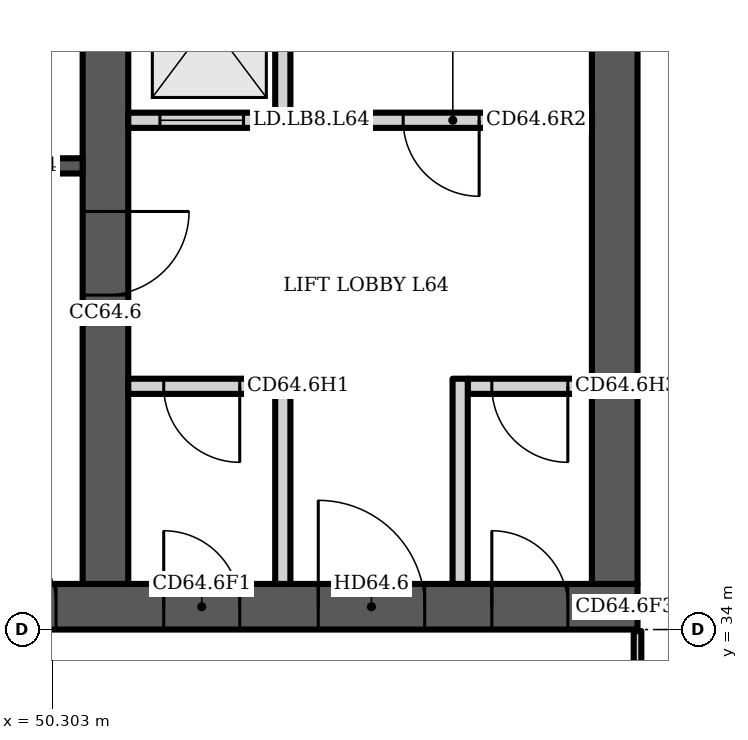
"""IFC4 building model, lengths in metres.
Left out: names, types, materials, properties, quantities, classifications, styles, units other than length and angle.
Written with IfcOpenShell. Run it as: python <this file> out.ifc"""

import sys

from ifc_helpers import new_model, si_unit, direction, frame, frame_2d, origin, place, context, subcontext, project, spatial, polyline, rectangle, outline, extrude, element, fill, save


model = new_model("IFC4")
c1 = context("Model", 3, precision=1e-05, world=origin(), true_north=direction((0.0, 1.0)))
c2 = subcontext(c1, "Body", "Model", "MODEL_VIEW")
j1 = project(units=[si_unit("LENGTHUNIT", "METRE"), si_unit("PLANEANGLEUNIT", "RADIAN")], contexts=[c1])
p1 = place(None, origin())
s1 = spatial("IfcSite", under=j1, at=p1, CompositionType="ELEMENT")
p2 = place(p1, origin())
s2 = spatial("IfcBuilding", under=s1, at=p2, CompositionType="ELEMENT")
p3 = place(p2, frame((0.0, 0.0, 253.9)))
s3 = spatial("IfcBuildingStorey", under=s2, at=p3, CompositionType="ELEMENT", Elevation=253.9)
p4 = place(p3, frame((23.0, 34.3, 0.0), z_axis=(0.0, 0.0, 1.0), x_axis=(1.0, 0.0, 0.0)))
e1 = element("IfcWall", 1, at=p4, inside=s3, PredefinedType="SHEAR", context=c2, shape_type="SweptSolid", body=[
    extrude(rectangle(XDim=35.0, YDim=0.6, at=frame_2d((17.5, 0.0))), origin(), (0.0, 0.0, 1.0), 3.6),
])
p5 = place(p4, frame((0.65, 0.0, 0.0)))
e2 = element("IfcOpeningElement", 2, at=p5, cuts=e1, PredefinedType="OPENING", context=c2, shape_type="SweptSolid", body=[
    extrude(rectangle(XDim=1.2, YDim=2.1, at=frame_2d((0.6, 1.05))), frame((0.0, 0.31, 0.0), z_axis=(0.0, -1.0, 0.0), x_axis=(1.0, 0.0, 0.0)), (0.0, 0.0, 1.0), 0.62),
])
p6 = place(p4, frame((7.717, 0.0, 0.0)))
e3 = element("IfcOpeningElement", 3, at=p6, cuts=e1, PredefinedType="OPENING", context=c2, shape_type="SweptSolid", body=[
    extrude(rectangle(XDim=1.1, YDim=2.1, at=frame_2d((0.55, 1.05))), frame((0.0, 0.31, 0.0), z_axis=(0.0, -1.0, 0.0), x_axis=(1.0, 0.0, 0.0)), (0.0, 0.0, 1.0), 0.62),
])
p7 = place(p4, frame((12.183, 0.0, 0.0)))
e4 = element("IfcOpeningElement", 4, at=p7, cuts=e1, PredefinedType="OPENING", context=c2, shape_type="SweptSolid", body=[
    extrude(rectangle(XDim=1.1, YDim=2.1, at=frame_2d((0.55, 1.05))), frame((0.0, 0.31, 0.0), z_axis=(0.0, -1.0, 0.0), x_axis=(1.0, 0.0, 0.0)), (0.0, 0.0, 1.0), 0.62),
])
p8 = place(p4, frame((9.8, 0.0, 0.0)))
e5 = element("IfcOpeningElement", 5, at=p8, cuts=e1, PredefinedType="OPENING", context=c2, shape_type="SweptSolid", body=[
    extrude(rectangle(XDim=1.4, YDim=2.1, at=frame_2d((0.7, 1.05))), frame((0.0, 0.31, 0.0), z_axis=(0.0, -1.0, 0.0), x_axis=(1.0, 0.0, 0.0)), (0.0, 0.0, 1.0), 0.62),
])
p9 = place(p4, frame((14.717, 0.0, 0.0)))
e6 = element("IfcOpeningElement", 6, at=p9, cuts=e1, PredefinedType="OPENING", context=c2, shape_type="SweptSolid", body=[
    extrude(rectangle(XDim=1.1, YDim=2.1, at=frame_2d((0.55, 1.05))), frame((0.0, 0.31, 0.0), z_axis=(0.0, -1.0, 0.0), x_axis=(1.0, 0.0, 0.0)), (0.0, 0.0, 1.0), 0.62),
])
p10 = place(p4, frame((16.95, 0.0, 0.0)))
e7 = element("IfcOpeningElement", 7, at=p10, cuts=e1, PredefinedType="OPENING", context=c2, shape_type="SweptSolid", body=[
    extrude(rectangle(XDim=1.1, YDim=2.1, at=frame_2d((0.55, 1.05))), frame((0.0, 0.31, 0.0), z_axis=(0.0, -1.0, 0.0), x_axis=(1.0, 0.0, 0.0)), (0.0, 0.0, 1.0), 0.62),
])
p11 = place(p4, frame((19.183, 0.0, 0.0)))
e8 = element("IfcOpeningElement", 8, at=p11, cuts=e1, PredefinedType="OPENING", context=c2, shape_type="SweptSolid", body=[
    extrude(rectangle(XDim=1.1, YDim=2.1, at=frame_2d((0.55, 1.05))), frame((0.0, 0.31, 0.0), z_axis=(0.0, -1.0, 0.0), x_axis=(1.0, 0.0, 0.0)), (0.0, 0.0, 1.0), 0.62),
])
p12 = place(p4, frame((26.15, 0.0, 0.0)))
e9 = element("IfcOpeningElement", 9, at=p12, cuts=e1, PredefinedType="OPENING", context=c2, shape_type="SweptSolid", body=[
    extrude(rectangle(XDim=1.2, YDim=2.1, at=frame_2d((0.6, 1.05))), frame((0.0, 0.31, 0.0), z_axis=(0.0, -1.0, 0.0), x_axis=(1.0, 0.0, 0.0)), (0.0, 0.0, 1.0), 0.62),
])
p13 = place(p4, frame((28.767, 0.0, 0.0)))
e10 = element("IfcOpeningElement", 10, at=p13, cuts=e1, PredefinedType="OPENING", context=c2, shape_type="SweptSolid", body=[
    extrude(rectangle(XDim=1.0, YDim=2.1, at=frame_2d((0.5, 1.05))), frame((0.0, 0.31, 0.0), z_axis=(0.0, -1.0, 0.0), x_axis=(1.0, 0.0, 0.0)), (0.0, 0.0, 1.0), 0.62),
])
p14 = place(p4, frame((33.083, 0.0, 0.0)))
e11 = element("IfcOpeningElement", 11, at=p14, cuts=e1, PredefinedType="OPENING", context=c2, shape_type="SweptSolid", body=[
    extrude(rectangle(XDim=1.0, YDim=2.1, at=frame_2d((0.5, 1.05))), frame((0.0, 0.31, 0.0), z_axis=(0.0, -1.0, 0.0), x_axis=(1.0, 0.0, 0.0)), (0.0, 0.0, 1.0), 0.62),
])
p15 = place(p4, frame((30.8, 0.0, 0.0)))
e12 = element("IfcOpeningElement", 12, at=p15, cuts=e1, PredefinedType="OPENING", context=c2, shape_type="SweptSolid", body=[
    extrude(rectangle(XDim=1.4, YDim=2.1, at=frame_2d((0.7, 1.05))), frame((0.0, 0.31, 0.0), z_axis=(0.0, -1.0, 0.0), x_axis=(1.0, 0.0, 0.0)), (0.0, 0.0, 1.0), 0.62),
])
p16 = place(p3, frame((51.0, 34.6, 0.0), z_axis=(0.0, 0.0, 1.0), x_axis=(0.0, 1.0, 0.0)))
e13 = element("IfcWall", 13, at=p16, inside=s3, PredefinedType="SHEAR", context=c2, shape_type="SweptSolid", body=[
    extrude(rectangle(XDim=14.171, YDim=0.6, at=frame_2d((7.085, 0.0))), origin(), (0.0, 0.0, 1.0), 3.6),
])
p17 = place(p16, frame((3.8, 0.0, 0.0)))
e14 = element("IfcOpeningElement", 14, at=p17, cuts=e13, PredefinedType="OPENING", context=c2, shape_type="SweptSolid", body=[
    extrude(rectangle(XDim=1.1, YDim=2.1, at=frame_2d((0.55, 1.05))), frame((0.0, 0.31, 0.0), z_axis=(0.0, -1.0, 0.0), x_axis=(1.0, 0.0, 0.0)), (0.0, 0.0, 1.0), 0.62),
])
p18 = place(p3, frame((57.7, 34.6, 0.0), z_axis=(0.0, 0.0, 1.0), x_axis=(0.0, 1.0, 0.0)))
e15 = element("IfcWall", 15, at=p18, inside=s3, PredefinedType="SHEAR", context=c2, shape_type="SweptSolid", body=[
    extrude(rectangle(XDim=13.585, YDim=0.6, at=frame_2d((6.792, 0.0))), origin(), (0.0, 0.0, 1.0), 3.6),
])
p19 = place(p3, frame((44.3, 40.1, 0.0), z_axis=(0.0, 0.0, 1.0), x_axis=(1.0, 0.0, 0.0)))
e16 = element("IfcWall", 16, at=p19, inside=s3, PredefinedType="SHEAR", context=c2, shape_type="SweptSolid", body=[
    extrude(rectangle(XDim=6.4, YDim=0.2, at=frame_2d((3.2, 0.0))), origin(), (0.0, 0.0, 1.0), 3.2),
])
p20 = place(p19, frame((3.625, 0.0, 0.0)))
e17 = element("IfcOpeningElement", 17, at=p20, cuts=e16, PredefinedType="OPENING", context=c2, shape_type="SweptSolid", body=[
    extrude(rectangle(XDim=1.2, YDim=2.1, at=frame_2d((0.6, 1.05))), frame((0.0, 0.11, 0.0), z_axis=(0.0, -1.0, 0.0), x_axis=(1.0, 0.0, 0.0)), (0.0, 0.0, 1.0), 0.22),
])
p21 = place(p19, frame((0.625, 0.0, 0.0)))
e18 = element("IfcOpeningElement", 18, at=p21, cuts=e16, PredefinedType="OPENING", context=c2, shape_type="SweptSolid", body=[
    extrude(rectangle(XDim=0.9, YDim=2.1, at=frame_2d((0.45, 1.05))), frame((0.0, 0.11, 0.0), z_axis=(0.0, -1.0, 0.0), x_axis=(1.0, 0.0, 0.0)), (0.0, 0.0, 1.0), 0.22),
])
p22 = place(p3, frame((51.3, 37.2, 0.0), z_axis=(0.0, 0.0, 1.0), x_axis=(1.0, 0.0, 0.0)))
e19 = element("IfcWall", 19, at=p22, inside=s3, PredefinedType="PARTITIONING", context=c2, shape_type="SweptSolid", body=[
    extrude(rectangle(XDim=1.933, YDim=0.2, at=frame_2d((0.967, 0.0))), origin(), (0.0, 0.0, 1.0), 3.2),
])
p23 = place(p22, frame((0.467, 0.0, 0.0)))
e20 = element("IfcOpeningElement", 20, at=p23, cuts=e19, PredefinedType="OPENING", context=c2, shape_type="SweptSolid", body=[
    extrude(rectangle(XDim=1.0, YDim=2.1, at=frame_2d((0.5, 1.05))), frame((0.0, 0.11, 0.0), z_axis=(0.0, -1.0, 0.0), x_axis=(1.0, 0.0, 0.0)), (0.0, 0.0, 1.0), 0.22),
])
p24 = place(p3, frame((55.767, 37.2, 0.0), z_axis=(0.0, 0.0, 1.0), x_axis=(1.0, 0.0, 0.0)))
e21 = element("IfcWall", 21, at=p24, inside=s3, PredefinedType="PARTITIONING", context=c2, shape_type="SweptSolid", body=[
    extrude(rectangle(XDim=1.633, YDim=0.2, at=frame_2d((0.817, 0.0))), origin(), (0.0, 0.0, 1.0), 3.2),
])
p25 = place(p24, frame((0.317, 0.0, 0.0)))
e22 = element("IfcOpeningElement", 22, at=p25, cuts=e21, PredefinedType="OPENING", context=c2, shape_type="SweptSolid", body=[
    extrude(rectangle(XDim=1.0, YDim=2.1, at=frame_2d((0.5, 1.05))), frame((0.0, 0.11, 0.0), z_axis=(0.0, -1.0, 0.0), x_axis=(1.0, 0.0, 0.0)), (0.0, 0.0, 1.0), 0.22),
])
p26 = place(p3, frame((51.3, 40.7, 0.0), z_axis=(0.0, 0.0, 1.0), x_axis=(1.0, 0.0, 0.0)))
e23 = element("IfcWall", 23, at=p26, inside=s3, PredefinedType="PARTITIONING", context=c2, shape_type="SweptSolid", body=[
    extrude(rectangle(XDim=6.1, YDim=0.2, at=frame_2d((3.05, 0.0))), origin(), (0.0, 0.0, 1.0), 3.2),
])
p27 = place(p26, frame((0.417, 0.0, 0.0)))
e24 = element("IfcOpeningElement", 24, at=p27, cuts=e23, PredefinedType="OPENING", context=c2, shape_type="SweptSolid", body=[
    extrude(rectangle(XDim=1.1, YDim=2.1, at=frame_2d((0.55, 1.05))), frame((0.0, 0.11, 0.0), z_axis=(0.0, -1.0, 0.0), x_axis=(1.0, 0.0, 0.0)), (0.0, 0.0, 1.0), 0.22),
])
p28 = place(p26, frame((3.617, 0.0, 0.0)))
e25 = element("IfcOpeningElement", 25, at=p28, cuts=e23, PredefinedType="OPENING", context=c2, shape_type="SweptSolid", body=[
    extrude(rectangle(XDim=1.0, YDim=2.1, at=frame_2d((0.5, 1.05))), frame((0.0, 0.11, 0.0), z_axis=(0.0, -1.0, 0.0), x_axis=(1.0, 0.0, 0.0)), (0.0, 0.0, 1.0), 0.22),
])
p29 = place(p3, origin())
e26 = element("IfcWall", 26, at=p29, inside=s3, PredefinedType="PARTITIONING", context=c2, shape_type="SweptSolid", body=[
    extrude(outline(polyline([(53.233, 34.6), (53.233, 37.3), (53.433, 37.3), (53.433, 34.6), (53.233, 34.6)])), origin(), (0.0, 0.0, 1.0), 3.2),
])
p30 = place(p3, origin())
e27 = element("IfcWall", 27, at=p30, inside=s3, PredefinedType="PARTITIONING", context=c2, shape_type="SweptSolid", body=[
    extrude(outline(polyline([(55.567, 34.6), (55.567, 37.3), (55.767, 37.3), (55.767, 34.6), (55.567, 34.6)])), origin(), (0.0, 0.0, 1.0), 3.2),
])
p31 = place(p3, origin())
e28 = element("IfcWall", 28, at=p31, inside=s3, PredefinedType="PARTITIONING", context=c2, shape_type="SweptSolid", body=[
    extrude(outline(polyline([(53.433, 40.8), (53.433, 43.8), (53.233, 43.8), (53.233, 40.8), (53.433, 40.8)])), origin(), (0.0, 0.0, 1.0), 3.2),
])
p32 = place(p3, frame((58.0, 31.4, 0.0), z_axis=(0.0, 0.0, 1.0), x_axis=(0.0, 1.0, 0.0)))
e29 = element("IfcWall", 29, at=p32, inside=s3, PredefinedType="PARTITIONING", context=c2, shape_type="SweptSolid", body=[
    extrude(rectangle(XDim=2.58, YDim=0.1, at=frame_2d((1.29, 0.0))), origin(), (0.0, 0.0, 1.0), 3.2),
])
p33 = place(p12, origin())
e30 = element("IfcDoor", 30, at=p33, inside=s3, OperationType="SINGLE_SWING_LEFT", PredefinedType="DOOR", context=c2, shape_type="SweptSolid", body=[
    extrude(rectangle(XDim=1.2, YDim=2.1, at=frame_2d((0.6, 1.05))), frame((0.0, 0.025, 0.0), z_axis=(0.0, -1.0, 0.0), x_axis=(1.0, 0.0, 0.0)), (0.0, 0.0, 1.0), 0.05),
])
fill(e9, e30)
p34 = place(p13, origin())
e31 = element("IfcDoor", 31, at=p34, inside=s3, OperationType="SINGLE_SWING_LEFT", PredefinedType="DOOR", context=c2, shape_type="SweptSolid", body=[
    extrude(rectangle(XDim=1.0, YDim=2.1, at=frame_2d((0.5, 1.05))), frame((0.0, 0.025, 0.0), z_axis=(0.0, -1.0, 0.0), x_axis=(1.0, 0.0, 0.0)), (0.0, 0.0, 1.0), 0.05),
])
fill(e10, e31)
p35 = place(p23, origin())
e32 = element("IfcDoor", 32, at=p35, inside=s3, OperationType="SINGLE_SWING_RIGHT", PredefinedType="DOOR", context=c2, shape_type="SweptSolid", body=[
    extrude(rectangle(XDim=1.0, YDim=2.1, at=frame_2d((0.5, 1.05))), frame((0.0, 0.025, 0.0), z_axis=(0.0, -1.0, 0.0), x_axis=(1.0, 0.0, 0.0)), (0.0, 0.0, 1.0), 0.05),
])
fill(e20, e32)
p36 = place(p14, origin())
e33 = element("IfcDoor", 33, at=p36, inside=s3, OperationType="SINGLE_SWING_LEFT", PredefinedType="DOOR", context=c2, shape_type="SweptSolid", body=[
    extrude(rectangle(XDim=1.0, YDim=2.1, at=frame_2d((0.5, 1.05))), frame((0.0, 0.025, 0.0), z_axis=(0.0, -1.0, 0.0), x_axis=(1.0, 0.0, 0.0)), (0.0, 0.0, 1.0), 0.05),
])
fill(e11, e33)
p37 = place(p25, origin())
e34 = element("IfcDoor", 34, at=p37, inside=s3, OperationType="SINGLE_SWING_RIGHT", PredefinedType="DOOR", context=c2, shape_type="SweptSolid", body=[
    extrude(rectangle(XDim=1.0, YDim=2.1, at=frame_2d((0.5, 1.05))), frame((0.0, 0.025, 0.0), z_axis=(0.0, -1.0, 0.0), x_axis=(1.0, 0.0, 0.0)), (0.0, 0.0, 1.0), 0.05),
])
fill(e22, e34)
p38 = place(p15, origin())
e35 = element("IfcDoor", 35, at=p38, inside=s3, OperationType="DOUBLE_DOOR_SINGLE_SWING", PredefinedType="DOOR", context=c2, shape_type="SweptSolid", body=[
    extrude(rectangle(XDim=1.4, YDim=2.1, at=frame_2d((0.7, 1.05))), frame((0.0, 0.025, 0.0), z_axis=(0.0, -1.0, 0.0), x_axis=(1.0, 0.0, 0.0)), (0.0, 0.0, 1.0), 0.05),
])
fill(e12, e35)
p39 = place(p27, origin())
e36 = element("IfcDoor", 36, at=p39, inside=s3, OperationType="DOUBLE_DOOR_SLIDING", PredefinedType="DOOR", context=c2, shape_type="SweptSolid", body=[
    extrude(rectangle(XDim=1.1, YDim=2.1, at=frame_2d((0.55, 1.05))), frame((0.0, 0.025, 0.0), z_axis=(0.0, -1.0, 0.0), x_axis=(1.0, 0.0, 0.0)), (0.0, 0.0, 1.0), 0.05),
])
fill(e24, e36)
p40 = place(p28, origin())
e37 = element("IfcDoor", 37, at=p40, inside=s3, OperationType="SINGLE_SWING_RIGHT", PredefinedType="DOOR", context=c2, shape_type="SweptSolid", body=[
    extrude(rectangle(XDim=1.0, YDim=2.1, at=frame_2d((0.5, 1.05))), frame((0.0, 0.025, 0.0), z_axis=(0.0, -1.0, 0.0), x_axis=(1.0, 0.0, 0.0)), (0.0, 0.0, 1.0), 0.05),
])
fill(e25, e37)
p41 = place(p17, origin())
e38 = element("IfcDoor", 38, at=p41, inside=s3, OperationType="SINGLE_SWING_RIGHT", PredefinedType="DOOR", context=c2, shape_type="SweptSolid", body=[
    extrude(rectangle(XDim=1.1, YDim=2.1, at=frame_2d((0.55, 1.05))), frame((0.0, 0.025, 0.0), z_axis=(0.0, -1.0, 0.0), x_axis=(1.0, 0.0, 0.0)), (0.0, 0.0, 1.0), 0.05),
])
fill(e14, e38)
save(model, sys.argv[1])
